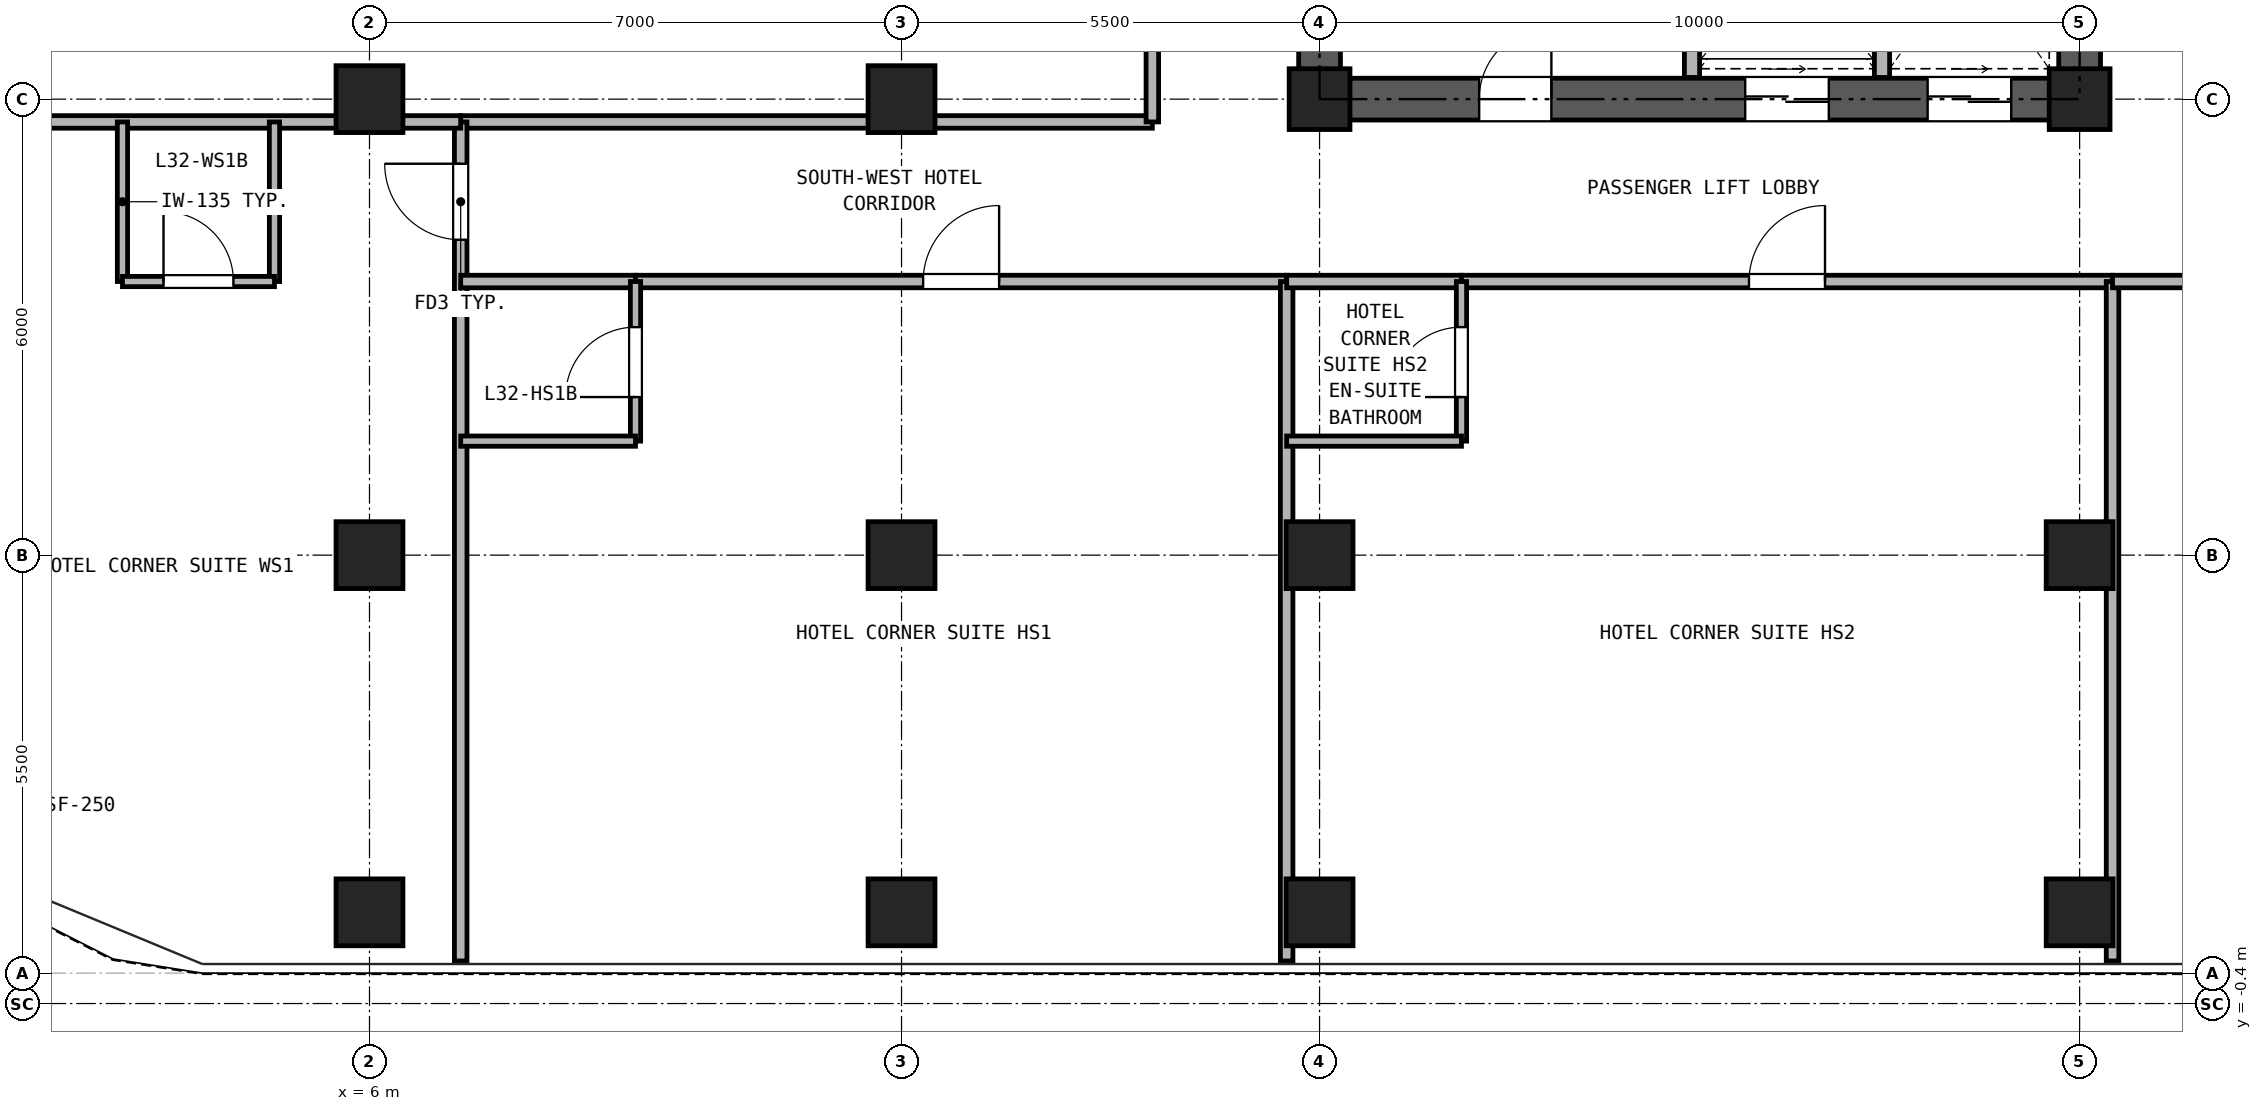
"""IFC4 building model, lengths in metres.
Left out: names, types, materials, properties, quantities, classifications, styles, units other than length and angle.
Written with IfcOpenShell. Run it as: python <this file> out.ifc"""

import sys

from ifc_helpers import new_model, si_unit, direction, frame, frame_2d, origin, origin_2d, place, context, subcontext, project, spatial, rectangle, hollow_rectangle, extrude, source, transform, mapped, element, fill, save


model = new_model("IFC4")
c1 = context("Model", 3, precision=1e-05, world=origin(), true_north=direction((0.0, 1.0)))
c2 = subcontext(c1, "Body", "Model", "MODEL_VIEW")
j1 = project(units=[si_unit("LENGTHUNIT", "METRE"), si_unit("PLANEANGLEUNIT", "RADIAN")], contexts=[c1])
p1 = place(None, origin())
s1 = spatial("IfcSite", under=j1, at=p1, CompositionType="ELEMENT")
p2 = place(p1, origin())
s2 = spatial("IfcBuilding", under=s1, at=p2, CompositionType="ELEMENT")
p3 = place(p2, frame((0.0, 0.0, 118.3)))
s3 = spatial("IfcBuildingStorey", under=s2, at=p3, CompositionType="ELEMENT", Elevation=118.3)
m1 = source(origin(), c2, "Body", "SweptSolid", [
    extrude(hollow_rectangle(XDim=0.88, YDim=0.88, WallThickness=0.05, at=origin_2d()), origin(), (0.0, 0.0, 1.0), 2.95),
])
for number, where, z_axis, x_axis in (
    (1, (6.0, 0.8, 0.0), (0.0, 0.0, 1.0), (1.0, 0.0, 0.0)),
    (2, (13.0, 0.8, 0.0), (0.0, 0.0, 1.0), (1.0, 0.0, 0.0)),
    (3, (18.5, 0.8, 0.0), (0.0, 0.0, 1.0), (1.0, 0.0, 0.0)),
    (4, (28.5, 0.8, 0.0), (0.0, 0.0, 1.0), (1.0, 0.0, 0.0)),
    (5, (6.0, 5.5, 0.0), (0.0, 0.0, 1.0), (1.0, 0.0, 0.0)),
    (6, (6.0, 11.5, 0.0), (0.0, 0.0, 1.0), (1.0, 0.0, 0.0)),
    (7, (13.0, 5.5, 0.0), (0.0, 0.0, 1.0), (1.0, 0.0, 0.0)),
    (8, (13.0, 11.5, 0.0), (0.0, 0.0, 1.0), (1.0, 0.0, 0.0)),
    (9, (18.5, 5.5, 0.0), (0.0, 0.0, 1.0), (1.0, 0.0, 0.0)),
):
    element("IfcColumn", number, at=place(p3, frame(where, z_axis=z_axis, x_axis=x_axis)), inside=s3, PredefinedType="COLUMN", context=c2, shape_type="MappedRepresentation", body=[
        mapped(m1, transform((0.0, 0.0, 0.0), x_axis=(1.0, 0.0, 0.0), y_axis=(0.0, 1.0, 0.0), z_axis=(0.0, 0.0, 1.0), scale=1.0)),
    ])
m2 = source(origin(), c2, "Body", "SweptSolid", [
    extrude(hollow_rectangle(XDim=0.8, YDim=0.8, WallThickness=0.045, at=origin_2d()), origin(), (0.0, 0.0, 1.0), 2.95),
])
p4 = place(p3, frame((18.5, 11.5, 0.0), z_axis=(0.0, 0.0, 1.0), x_axis=(1.0, 0.0, 0.0)))
e10 = element("IfcColumn", 10, at=p4, inside=s3, PredefinedType="COLUMN", context=c2, shape_type="MappedRepresentation", body=[
    mapped(m2, transform((0.0, 0.0, 0.0), x_axis=(1.0, 0.0, 0.0), y_axis=(0.0, 1.0, 0.0), z_axis=(0.0, 0.0, 1.0), scale=1.0)),
])
p5 = place(p3, frame((28.5, 5.5, 0.0), z_axis=(0.0, 0.0, 1.0), x_axis=(1.0, 0.0, 0.0)))
e11 = element("IfcColumn", 11, at=p5, inside=s3, PredefinedType="COLUMN", context=c2, shape_type="MappedRepresentation", body=[
    mapped(m1, transform((0.0, 0.0, 0.0), x_axis=(1.0, 0.0, 0.0), y_axis=(0.0, 1.0, 0.0), z_axis=(0.0, 0.0, 1.0), scale=1.0)),
])
p6 = place(p3, frame((28.5, 11.5, 0.0), z_axis=(0.0, 0.0, 1.0), x_axis=(1.0, 0.0, 0.0)))
e12 = element("IfcColumn", 12, at=p6, inside=s3, PredefinedType="COLUMN", context=c2, shape_type="MappedRepresentation", body=[
    mapped(m2, transform((0.0, 0.0, 0.0), x_axis=(1.0, 0.0, 0.0), y_axis=(0.0, 1.0, 0.0), z_axis=(0.0, 0.0, 1.0), scale=1.0)),
])
p7 = place(p3, frame((18.225, 11.5, 0.0), z_axis=(0.0, 0.0, 1.0), x_axis=(1.0, 0.0, 0.0)))
e13 = element("IfcWall", 13, at=p7, inside=s3, PredefinedType="SHEAR", context=c2, shape_type="SweptSolid", body=[
    extrude(rectangle(XDim=10.55, YDim=0.55, at=frame_2d((5.275, 0.0))), origin(), (0.0, 0.0, 1.0), 2.95),
])
p8 = place(p7, frame((2.375, 0.0, 0.0)))
e14 = element("IfcOpeningElement", 14, at=p8, cuts=e13, PredefinedType="OPENING", context=c2, shape_type="SweptSolid", body=[
    extrude(rectangle(XDim=0.95, YDim=2.15, at=frame_2d((0.475, 1.075))), frame((0.0, 0.285, 0.0), z_axis=(0.0, -1.0, 0.0), x_axis=(1.0, 0.0, 0.0)), (0.0, 0.0, 1.0), 0.57),
])
p9 = place(p7, frame((5.875, 0.0, 0.0)))
e15 = element("IfcOpeningElement", 15, at=p9, cuts=e13, PredefinedType="OPENING", context=c2, shape_type="SweptSolid", body=[
    extrude(rectangle(XDim=1.1, YDim=2.25, at=frame_2d((0.55, 1.125))), frame((0.0, 0.285, 0.0), z_axis=(0.0, -1.0, 0.0), x_axis=(1.0, 0.0, 0.0)), (0.0, 0.0, 1.0), 0.57),
])
p10 = place(p7, frame((8.275, 0.0, 0.0)))
e16 = element("IfcOpeningElement", 16, at=p10, cuts=e13, PredefinedType="OPENING", context=c2, shape_type="SweptSolid", body=[
    extrude(rectangle(XDim=1.1, YDim=2.25, at=frame_2d((0.55, 1.125))), frame((0.0, 0.285, 0.0), z_axis=(0.0, -1.0, 0.0), x_axis=(1.0, 0.0, 0.0)), (0.0, 0.0, 1.0), 0.57),
])
p11 = place(p3, frame((18.5, 11.775, 0.0), z_axis=(0.0, 0.0, 1.0), x_axis=(0.0, 1.0, 0.0)))
e17 = element("IfcWall", 17, at=p11, inside=s3, PredefinedType="SHEAR", context=c2, shape_type="SweptSolid", body=[
    extrude(rectangle(XDim=16.7, YDim=0.55, at=frame_2d((8.35, 0.0))), origin(), (0.0, 0.0, 1.0), 2.95),
])
p12 = place(p11, frame((7.375, 0.0, 0.0)))
e18 = element("IfcOpeningElement", 18, at=p12, cuts=e17, PredefinedType="OPENING", context=c2, shape_type="SweptSolid", body=[
    extrude(rectangle(XDim=1.15, YDim=2.2, at=frame_2d((0.575, 1.1))), frame((0.0, 0.285, 0.0), z_axis=(0.0, -1.0, 0.0), x_axis=(1.0, 0.0, 0.0)), (0.0, 0.0, 1.0), 0.57),
])
p13 = place(p3, frame((28.5, 11.775, 0.0), z_axis=(0.0, 0.0, 1.0), x_axis=(0.0, 1.0, 0.0)))
e19 = element("IfcWall", 19, at=p13, inside=s3, PredefinedType="SHEAR", context=c2, shape_type="SweptSolid", body=[
    extrude(rectangle(XDim=16.7, YDim=0.55, at=frame_2d((8.35, 0.0))), origin(), (0.0, 0.0, 1.0), 2.95),
])
p14 = place(p13, frame((7.375, 0.0, 0.0)))
e20 = element("IfcOpeningElement", 20, at=p14, cuts=e19, PredefinedType="OPENING", context=c2, shape_type="SweptSolid", body=[
    extrude(rectangle(XDim=1.15, YDim=2.2, at=frame_2d((0.575, 1.1))), frame((0.0, 0.285, 0.0), z_axis=(0.0, -1.0, 0.0), x_axis=(1.0, 0.0, 0.0)), (0.0, 0.0, 1.0), 0.57),
])
for number, where, z_axis, x_axis in (
    (21, (23.4, 11.785, 0.0), (0.0, 0.0, 1.0), (0.0, 1.0, 0.0)),
    (22, (25.9, 11.785, 0.0), (0.0, 0.0, 1.0), (0.0, 1.0, 0.0)),
):
    element("IfcWall", number, at=place(p3, frame(where, z_axis=z_axis, x_axis=x_axis)), inside=s3, PredefinedType="PARTITIONING", context=c2, shape_type="SweptSolid", body=[
        extrude(rectangle(XDim=3.215, YDim=0.2, at=frame_2d((1.607, 0.0))), origin(), (0.0, 0.0, 1.0), 2.95),
    ])
p15 = place(p3, frame((7.2, 11.2, 0.0), z_axis=(0.0, 0.0, 1.0), x_axis=(1.0, 0.0, 0.0)))
e23 = element("IfcWall", 23, at=p15, inside=s3, PredefinedType="PARTITIONING", context=c2, shape_type="SweptSolid", body=[
    extrude(rectangle(XDim=9.1, YDim=0.165, at=frame_2d((4.55, 0.0))), origin(), (0.0, 0.0, 1.0), 2.95),
])
p16 = place(p3, frame((16.3, 11.2, 0.0), z_axis=(0.0, 0.0, 1.0), x_axis=(0.0, 1.0, 0.0)))
e24 = element("IfcWall", 24, at=p16, inside=s3, PredefinedType="PARTITIONING", context=c2, shape_type="SweptSolid", body=[
    extrude(rectangle(XDim=18.75, YDim=0.165, at=frame_2d((9.375, 0.0))), origin(), (0.0, 0.0, 1.0), 2.95),
])
p17 = place(p16, frame((8.875, 0.0, 0.0)))
e25 = element("IfcOpeningElement", 25, at=p17, cuts=e24, PredefinedType="OPENING", context=c2, shape_type="SweptSolid", body=[
    extrude(rectangle(XDim=0.95, YDim=2.15, at=frame_2d((0.475, 1.075))), frame((0.0, 0.093, 0.0), z_axis=(0.0, -1.0, 0.0), x_axis=(1.0, 0.0, 0.0)), (0.0, 0.0, 1.0), 0.185),
])
p18 = place(p3, frame((7.2, 0.16, 0.0), z_axis=(0.0, 0.0, 1.0), x_axis=(0.0, 1.0, 0.0)))
e26 = element("IfcWall", 26, at=p18, inside=s3, PredefinedType="PARTITIONING", context=c2, shape_type="SweptSolid", body=[
    extrude(rectangle(XDim=11.04, YDim=0.165, at=frame_2d((5.52, 0.0))), origin(), (0.0, 0.0, 1.0), 2.95),
])
p19 = place(p18, frame((9.49, 0.0, 0.0)))
e27 = element("IfcOpeningElement", 27, at=p19, cuts=e26, PredefinedType="OPENING", context=c2, shape_type="SweptSolid", body=[
    extrude(rectangle(XDim=1.0, YDim=2.15, at=frame_2d((0.5, 1.075))), frame((0.0, 0.093, 0.0), z_axis=(0.0, -1.0, 0.0), x_axis=(1.0, 0.0, 0.0)), (0.0, 0.0, 1.0), 0.185),
])
p20 = place(p3, frame((0.16, 11.2, 0.0), z_axis=(0.0, 0.0, 1.0), x_axis=(1.0, 0.0, 0.0)))
e28 = element("IfcWall", 28, at=p20, inside=s3, PredefinedType="PARTITIONING", context=c2, shape_type="SweptSolid", body=[
    extrude(rectangle(XDim=7.04, YDim=0.165, at=frame_2d((3.52, 0.0))), origin(), (0.0, 0.0, 1.0), 2.95),
])
for number, where, z_axis, x_axis in (
    (29, (2.75, 9.1, 0.0), (0.0, 0.0, 1.0), (0.0, 1.0, 0.0)),
    (30, (4.75, 9.1, 0.0), (0.0, 0.0, 1.0), (0.0, 1.0, 0.0)),
):
    element("IfcWall", number, at=place(p3, frame(where, z_axis=z_axis, x_axis=x_axis)), inside=s3, PredefinedType="PARTITIONING", context=c2, shape_type="SweptSolid", body=[
        extrude(rectangle(XDim=2.1, YDim=0.135, at=frame_2d((1.05, 0.0))), origin(), (0.0, 0.0, 1.0), 2.95),
    ])
p21 = place(p3, frame((2.75, 9.1, 0.0), z_axis=(0.0, 0.0, 1.0), x_axis=(1.0, 0.0, 0.0)))
e31 = element("IfcWall", 31, at=p21, inside=s3, PredefinedType="PARTITIONING", context=c2, shape_type="SweptSolid", body=[
    extrude(rectangle(XDim=2.0, YDim=0.135, at=frame_2d((1.0, 0.0))), origin(), (0.0, 0.0, 1.0), 2.95),
])
p22 = place(p21, frame((0.54, 0.0, 0.0)))
e32 = element("IfcOpeningElement", 32, at=p22, cuts=e31, PredefinedType="OPENING", context=c2, shape_type="SweptSolid", body=[
    extrude(rectangle(XDim=0.92, YDim=2.1, at=frame_2d((0.46, 1.05))), frame((0.0, 0.077, 0.0), z_axis=(0.0, -1.0, 0.0), x_axis=(1.0, 0.0, 0.0)), (0.0, 0.0, 1.0), 0.155),
])
p23 = place(p3, frame((7.2, 9.1, 0.0), z_axis=(0.0, 0.0, 1.0), x_axis=(1.0, 0.0, 0.0)))
e33 = element("IfcWall", 33, at=p23, inside=s3, PredefinedType="PARTITIONING", context=c2, shape_type="SweptSolid", body=[
    extrude(rectangle(XDim=2.3, YDim=0.165, at=frame_2d((1.15, 0.0))), origin(), (0.0, 0.0, 1.0), 2.95),
])
p24 = place(p3, frame((9.5, 9.1, 0.0), z_axis=(0.0, 0.0, 1.0), x_axis=(1.0, 0.0, 0.0)))
e34 = element("IfcWall", 34, at=p24, inside=s3, PredefinedType="PARTITIONING", context=c2, shape_type="SweptSolid", body=[
    extrude(rectangle(XDim=8.567, YDim=0.165, at=frame_2d((4.283, 0.0))), origin(), (0.0, 0.0, 1.0), 2.95),
])
p25 = place(p24, frame((3.784, 0.0, 0.0)))
e35 = element("IfcOpeningElement", 35, at=p25, cuts=e34, PredefinedType="OPENING", context=c2, shape_type="SweptSolid", body=[
    extrude(rectangle(XDim=1.0, YDim=2.15, at=frame_2d((0.5, 1.075))), frame((0.0, 0.093, 0.0), z_axis=(0.0, -1.0, 0.0), x_axis=(1.0, 0.0, 0.0)), (0.0, 0.0, 1.0), 0.185),
])
p26 = place(p3, frame((9.5, 7.0, 0.0), z_axis=(0.0, 0.0, 1.0), x_axis=(0.0, 1.0, 0.0)))
e36 = element("IfcWall", 36, at=p26, inside=s3, PredefinedType="PARTITIONING", context=c2, shape_type="SweptSolid", body=[
    extrude(rectangle(XDim=2.1, YDim=0.135, at=frame_2d((1.05, 0.0))), origin(), (0.0, 0.0, 1.0), 2.95),
])
p27 = place(p26, frame((0.58, 0.0, 0.0)))
e37 = element("IfcOpeningElement", 37, at=p27, cuts=e36, PredefinedType="OPENING", context=c2, shape_type="SweptSolid", body=[
    extrude(rectangle(XDim=0.92, YDim=2.1, at=frame_2d((0.46, 1.05))), frame((0.0, 0.077, 0.0), z_axis=(0.0, -1.0, 0.0), x_axis=(1.0, 0.0, 0.0)), (0.0, 0.0, 1.0), 0.155),
])
p28 = place(p3, frame((7.2, 7.0, 0.0), z_axis=(0.0, 0.0, 1.0), x_axis=(1.0, 0.0, 0.0)))
e38 = element("IfcWall", 38, at=p28, inside=s3, PredefinedType="PARTITIONING", context=c2, shape_type="SweptSolid", body=[
    extrude(rectangle(XDim=2.3, YDim=0.135, at=frame_2d((1.15, 0.0))), origin(), (0.0, 0.0, 1.0), 2.95),
])
p29 = place(p3, frame((18.067, 0.16, 0.0), z_axis=(0.0, 0.0, 1.0), x_axis=(0.0, 1.0, 0.0)))
e39 = element("IfcWall", 39, at=p29, inside=s3, PredefinedType="PARTITIONING", context=c2, shape_type="SweptSolid", body=[
    extrude(rectangle(XDim=8.94, YDim=0.165, at=frame_2d((4.47, 0.0))), origin(), (0.0, 0.0, 1.0), 2.95),
])
p30 = place(p3, frame((18.067, 9.1, 0.0), z_axis=(0.0, 0.0, 1.0), x_axis=(1.0, 0.0, 0.0)))
e40 = element("IfcWall", 40, at=p30, inside=s3, PredefinedType="PARTITIONING", context=c2, shape_type="SweptSolid", body=[
    extrude(rectangle(XDim=2.3, YDim=0.165, at=frame_2d((1.15, 0.0))), origin(), (0.0, 0.0, 1.0), 2.95),
])
p31 = place(p3, frame((20.367, 9.1, 0.0), z_axis=(0.0, 0.0, 1.0), x_axis=(1.0, 0.0, 0.0)))
e41 = element("IfcWall", 41, at=p31, inside=s3, PredefinedType="PARTITIONING", context=c2, shape_type="SweptSolid", body=[
    extrude(rectangle(XDim=8.566, YDim=0.165, at=frame_2d((4.283, 0.0))), origin(), (0.0, 0.0, 1.0), 2.95),
])
p32 = place(p31, frame((3.783, 0.0, 0.0)))
e42 = element("IfcOpeningElement", 42, at=p32, cuts=e41, PredefinedType="OPENING", context=c2, shape_type="SweptSolid", body=[
    extrude(rectangle(XDim=1.0, YDim=2.15, at=frame_2d((0.5, 1.075))), frame((0.0, 0.093, 0.0), z_axis=(0.0, -1.0, 0.0), x_axis=(1.0, 0.0, 0.0)), (0.0, 0.0, 1.0), 0.185),
])
p33 = place(p3, frame((20.367, 7.0, 0.0), z_axis=(0.0, 0.0, 1.0), x_axis=(0.0, 1.0, 0.0)))
e43 = element("IfcWall", 43, at=p33, inside=s3, PredefinedType="PARTITIONING", context=c2, shape_type="SweptSolid", body=[
    extrude(rectangle(XDim=2.1, YDim=0.135, at=frame_2d((1.05, 0.0))), origin(), (0.0, 0.0, 1.0), 2.95),
])
p34 = place(p33, frame((0.58, 0.0, 0.0)))
e44 = element("IfcOpeningElement", 44, at=p34, cuts=e43, PredefinedType="OPENING", context=c2, shape_type="SweptSolid", body=[
    extrude(rectangle(XDim=0.92, YDim=2.1, at=frame_2d((0.46, 1.05))), frame((0.0, 0.077, 0.0), z_axis=(0.0, -1.0, 0.0), x_axis=(1.0, 0.0, 0.0)), (0.0, 0.0, 1.0), 0.155),
])
p35 = place(p3, frame((18.067, 7.0, 0.0), z_axis=(0.0, 0.0, 1.0), x_axis=(1.0, 0.0, 0.0)))
e45 = element("IfcWall", 45, at=p35, inside=s3, PredefinedType="PARTITIONING", context=c2, shape_type="SweptSolid", body=[
    extrude(rectangle(XDim=2.3, YDim=0.135, at=frame_2d((1.15, 0.0))), origin(), (0.0, 0.0, 1.0), 2.95),
])
p36 = place(p3, frame((28.933, 0.16, 0.0), z_axis=(0.0, 0.0, 1.0), x_axis=(0.0, 1.0, 0.0)))
e46 = element("IfcWall", 46, at=p36, inside=s3, PredefinedType="PARTITIONING", context=c2, shape_type="SweptSolid", body=[
    extrude(rectangle(XDim=8.94, YDim=0.165, at=frame_2d((4.47, 0.0))), origin(), (0.0, 0.0, 1.0), 2.95),
])
p37 = place(p3, frame((28.933, 9.1, 0.0), z_axis=(0.0, 0.0, 1.0), x_axis=(1.0, 0.0, 0.0)))
e47 = element("IfcWall", 47, at=p37, inside=s3, PredefinedType="PARTITIONING", context=c2, shape_type="SweptSolid", body=[
    extrude(rectangle(XDim=8.567, YDim=0.165, at=frame_2d((4.283, 0.0))), origin(), (0.0, 0.0, 1.0), 2.95),
])
p38 = place(p37, frame((3.783, 0.0, 0.0)))
e48 = element("IfcOpeningElement", 48, at=p38, cuts=e47, PredefinedType="OPENING", context=c2, shape_type="SweptSolid", body=[
    extrude(rectangle(XDim=1.0, YDim=2.15, at=frame_2d((0.5, 1.075))), frame((0.0, 0.093, 0.0), z_axis=(0.0, -1.0, 0.0), x_axis=(1.0, 0.0, 0.0)), (0.0, 0.0, 1.0), 0.185),
])
p39 = place(p8, frame((0.95, 0.0, 0.0), z_axis=(0.0, 0.0, 1.0), x_axis=(-1.0, 0.0, 0.0)))
e49 = element("IfcDoor", 49, at=p39, inside=s3, OperationType="SINGLE_SWING_RIGHT", PredefinedType="DOOR", context=c2, shape_type="SweptSolid", body=[
    extrude(rectangle(XDim=0.95, YDim=2.15, at=frame_2d((0.475, 1.075))), frame((0.0, 0.025, 0.0), z_axis=(0.0, -1.0, 0.0), x_axis=(1.0, 0.0, 0.0)), (0.0, 0.0, 1.0), 0.05),
])
fill(e14, e49)
p40 = place(p9, frame((1.1, 0.0, 0.0), z_axis=(0.0, 0.0, 1.0), x_axis=(-1.0, 0.0, 0.0)))
e50 = element("IfcDoor", 50, at=p40, inside=s3, OperationType="DOUBLE_DOOR_SLIDING", PredefinedType="DOOR", context=c2, shape_type="SweptSolid", body=[
    extrude(rectangle(XDim=1.1, YDim=2.25, at=frame_2d((0.55, 1.125))), frame((0.0, 0.025, 0.0), z_axis=(0.0, -1.0, 0.0), x_axis=(1.0, 0.0, 0.0)), (0.0, 0.0, 1.0), 0.05),
])
fill(e15, e50)
p41 = place(p10, frame((1.1, 0.0, 0.0), z_axis=(0.0, 0.0, 1.0), x_axis=(-1.0, 0.0, 0.0)))
e51 = element("IfcDoor", 51, at=p41, inside=s3, OperationType="DOUBLE_DOOR_SLIDING", PredefinedType="DOOR", context=c2, shape_type="SweptSolid", body=[
    extrude(rectangle(XDim=1.1, YDim=2.25, at=frame_2d((0.55, 1.125))), frame((0.0, 0.025, 0.0), z_axis=(0.0, -1.0, 0.0), x_axis=(1.0, 0.0, 0.0)), (0.0, 0.0, 1.0), 0.05),
])
fill(e16, e51)
p42 = place(p22, origin())
e52 = element("IfcDoor", 52, at=p42, inside=s3, OperationType="SINGLE_SWING_LEFT", PredefinedType="DOOR", context=c2, shape_type="SweptSolid", body=[
    extrude(rectangle(XDim=0.92, YDim=2.1, at=frame_2d((0.46, 1.05))), frame((0.0, 0.025, 0.0), z_axis=(0.0, -1.0, 0.0), x_axis=(1.0, 0.0, 0.0)), (0.0, 0.0, 1.0), 0.05),
])
fill(e32, e52)
p43 = place(p19, origin())
e53 = element("IfcDoor", 53, at=p43, inside=s3, OperationType="SINGLE_SWING_RIGHT", PredefinedType="DOOR", context=c2, shape_type="SweptSolid", body=[
    extrude(rectangle(XDim=1.0, YDim=2.15, at=frame_2d((0.5, 1.075))), frame((0.0, 0.025, 0.0), z_axis=(0.0, -1.0, 0.0), x_axis=(1.0, 0.0, 0.0)), (0.0, 0.0, 1.0), 0.05),
])
fill(e27, e53)
p44 = place(p27, frame((0.92, 0.0, 0.0), z_axis=(0.0, 0.0, 1.0), x_axis=(-1.0, 0.0, 0.0)))
e54 = element("IfcDoor", 54, at=p44, inside=s3, OperationType="SINGLE_SWING_LEFT", PredefinedType="DOOR", context=c2, shape_type="SweptSolid", body=[
    extrude(rectangle(XDim=0.92, YDim=2.1, at=frame_2d((0.46, 1.05))), frame((0.0, 0.025, 0.0), z_axis=(0.0, -1.0, 0.0), x_axis=(1.0, 0.0, 0.0)), (0.0, 0.0, 1.0), 0.05),
])
fill(e37, e54)
p45 = place(p25, frame((1.0, 0.0, 0.0), z_axis=(0.0, 0.0, 1.0), x_axis=(-1.0, 0.0, 0.0)))
e55 = element("IfcDoor", 55, at=p45, inside=s3, OperationType="SINGLE_SWING_RIGHT", PredefinedType="DOOR", context=c2, shape_type="SweptSolid", body=[
    extrude(rectangle(XDim=1.0, YDim=2.15, at=frame_2d((0.5, 1.075))), frame((0.0, 0.025, 0.0), z_axis=(0.0, -1.0, 0.0), x_axis=(1.0, 0.0, 0.0)), (0.0, 0.0, 1.0), 0.05),
])
fill(e35, e55)
p46 = place(p34, frame((0.92, 0.0, 0.0), z_axis=(0.0, 0.0, 1.0), x_axis=(-1.0, 0.0, 0.0)))
e56 = element("IfcDoor", 56, at=p46, inside=s3, OperationType="SINGLE_SWING_LEFT", PredefinedType="DOOR", context=c2, shape_type="SweptSolid", body=[
    extrude(rectangle(XDim=0.92, YDim=2.1, at=frame_2d((0.46, 1.05))), frame((0.0, 0.025, 0.0), z_axis=(0.0, -1.0, 0.0), x_axis=(1.0, 0.0, 0.0)), (0.0, 0.0, 1.0), 0.05),
])
fill(e44, e56)
p47 = place(p32, frame((1.0, 0.0, 0.0), z_axis=(0.0, 0.0, 1.0), x_axis=(-1.0, 0.0, 0.0)))
e57 = element("IfcDoor", 57, at=p47, inside=s3, OperationType="SINGLE_SWING_RIGHT", PredefinedType="DOOR", context=c2, shape_type="SweptSolid", body=[
    extrude(rectangle(XDim=1.0, YDim=2.15, at=frame_2d((0.5, 1.075))), frame((0.0, 0.025, 0.0), z_axis=(0.0, -1.0, 0.0), x_axis=(1.0, 0.0, 0.0)), (0.0, 0.0, 1.0), 0.05),
])
fill(e42, e57)
save(model, sys.argv[1])
